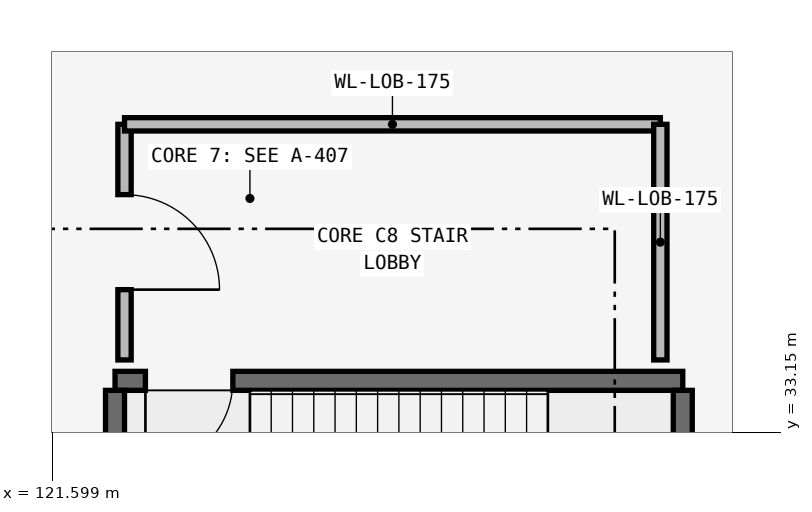
"""IFC4 building model, lengths in metres.
Left out: names, types, materials, properties, quantities, classifications, styles, units other than length and angle.
Written with IfcOpenShell. Run it as: python <this file> out.ifc"""

import sys

from ifc_helpers import new_model, si_unit, direction, frame, frame_2d, origin, place, context, subcontext, project, spatial, rectangle, extrude, element, fill, save


model = new_model("IFC4")
c1 = context("Model", 3, precision=1e-05, world=origin(), true_north=direction((0.0, 1.0)))
c2 = subcontext(c1, "Body", "Model", "MODEL_VIEW")
j1 = project(units=[si_unit("LENGTHUNIT", "METRE"), si_unit("PLANEANGLEUNIT", "RADIAN")], contexts=[c1])
p1 = place(None, origin())
s1 = spatial("IfcSite", under=j1, at=p1, CompositionType="ELEMENT")
p2 = place(p1, origin())
s2 = spatial("IfcBuilding", under=s1, at=p2, CompositionType="ELEMENT")
p3 = place(p2, origin())
s3 = spatial("IfcBuildingStorey", under=s2, at=p3, CompositionType="ELEMENT", Elevation=0.0)
p4 = place(p3, frame((122.425, 33.825, 0.0), z_axis=(0.0, 0.0, 1.0), x_axis=(1.0, 0.0, 0.0)))
e1 = element("IfcWall", 1, at=p4, inside=s3, PredefinedType="SHEAR", context=c2, shape_type="SweptSolid", body=[
    extrude(rectangle(XDim=7.47, YDim=0.25, at=frame_2d((3.735, 0.0))), origin(), (0.0, 0.0, 1.0), 5.08),
])
p5 = place(p4, frame((0.4, 0.0, 0.0)))
e2 = element("IfcOpeningElement", 2, at=p5, cuts=e1, PredefinedType="OPENING", context=c2, shape_type="SweptSolid", body=[
    extrude(rectangle(XDim=1.15, YDim=2.15, at=frame_2d((0.575, 1.075))), frame((0.0, 0.14, 0.0), z_axis=(0.0, -1.0, 0.0), x_axis=(1.0, 0.0, 0.0)), (0.0, 0.0, 1.0), 0.28),
])
for number, where, z_axis, x_axis in (
    (3, (122.425, 30.2, 0.0), (0.0, 0.0, 1.0), (0.0, 1.0, 0.0)),
    (4, (129.895, 30.2, 0.0), (0.0, 0.0, 1.0), (0.0, 1.0, 0.0)),
):
    element("IfcWall", number, at=place(p3, frame(where, z_axis=z_axis, x_axis=x_axis)), inside=s3, PredefinedType="SHEAR", context=c2, shape_type="SweptSolid", body=[
        extrude(rectangle(XDim=3.5, YDim=0.25, at=frame_2d((1.75, 0.0))), origin(), (0.0, 0.0, 1.0), 5.08),
    ])
p6 = place(p3, frame((122.55, 34.1, 0.0), z_axis=(0.0, 0.0, 1.0), x_axis=(0.0, 1.0, 0.0)))
e5 = element("IfcWall", 5, at=p6, inside=s3, PredefinedType="PARTITIONING", context=c2, shape_type="SweptSolid", body=[
    extrude(rectangle(XDim=3.1, YDim=0.175, at=frame_2d((1.55, 0.0))), origin(), (0.0, 0.0, 1.0), 5.08),
])
p7 = place(p6, frame((0.925, 0.0, 0.0)))
e6 = element("IfcOpeningElement", 6, at=p7, cuts=e5, PredefinedType="OPENING", context=c2, shape_type="SweptSolid", body=[
    extrude(rectangle(XDim=1.25, YDim=2.2, at=frame_2d((0.625, 1.1))), frame((0.0, 0.103, 0.0), z_axis=(0.0, -1.0, 0.0), x_axis=(1.0, 0.0, 0.0)), (0.0, 0.0, 1.0), 0.205),
])
p8 = place(p3, frame((122.55, 37.2, 0.0), z_axis=(0.0, 0.0, 1.0), x_axis=(1.0, 0.0, 0.0)))
e7 = element("IfcWall", 7, at=p8, inside=s3, PredefinedType="PARTITIONING", context=c2, shape_type="SweptSolid", body=[
    extrude(rectangle(XDim=7.05, YDim=0.175, at=frame_2d((3.525, 0.0))), origin(), (0.0, 0.0, 1.0), 5.08),
])
p9 = place(p3, frame((129.6, 34.1, 0.0), z_axis=(0.0, 0.0, 1.0), x_axis=(0.0, 1.0, 0.0)))
e8 = element("IfcWall", 8, at=p9, inside=s3, PredefinedType="PARTITIONING", context=c2, shape_type="SweptSolid", body=[
    extrude(rectangle(XDim=3.1, YDim=0.175, at=frame_2d((1.55, 0.0))), origin(), (0.0, 0.0, 1.0), 5.08),
])
p10 = place(p5, origin())
e9 = element("IfcDoor", 9, at=p10, inside=s3, OperationType="SINGLE_SWING_LEFT", PredefinedType="DOOR", context=c2, shape_type="SweptSolid", body=[
    extrude(rectangle(XDim=1.15, YDim=2.15, at=frame_2d((0.575, 1.075))), frame((0.0, 0.025, 0.0), z_axis=(0.0, -1.0, 0.0), x_axis=(1.0, 0.0, 0.0)), (0.0, 0.0, 1.0), 0.05),
])
fill(e2, e9)
p11 = place(p7, frame((1.25, 0.0, 0.0), z_axis=(0.0, 0.0, 1.0), x_axis=(-1.0, 0.0, 0.0)))
e10 = element("IfcDoor", 10, at=p11, inside=s3, OperationType="SINGLE_SWING_LEFT", PredefinedType="DOOR", context=c2, shape_type="SweptSolid", body=[
    extrude(rectangle(XDim=1.25, YDim=2.2, at=frame_2d((0.625, 1.1))), frame((0.0, 0.025, 0.0), z_axis=(0.0, -1.0, 0.0), x_axis=(1.0, 0.0, 0.0)), (0.0, 0.0, 1.0), 0.05),
])
fill(e6, e10)
save(model, sys.argv[1])
